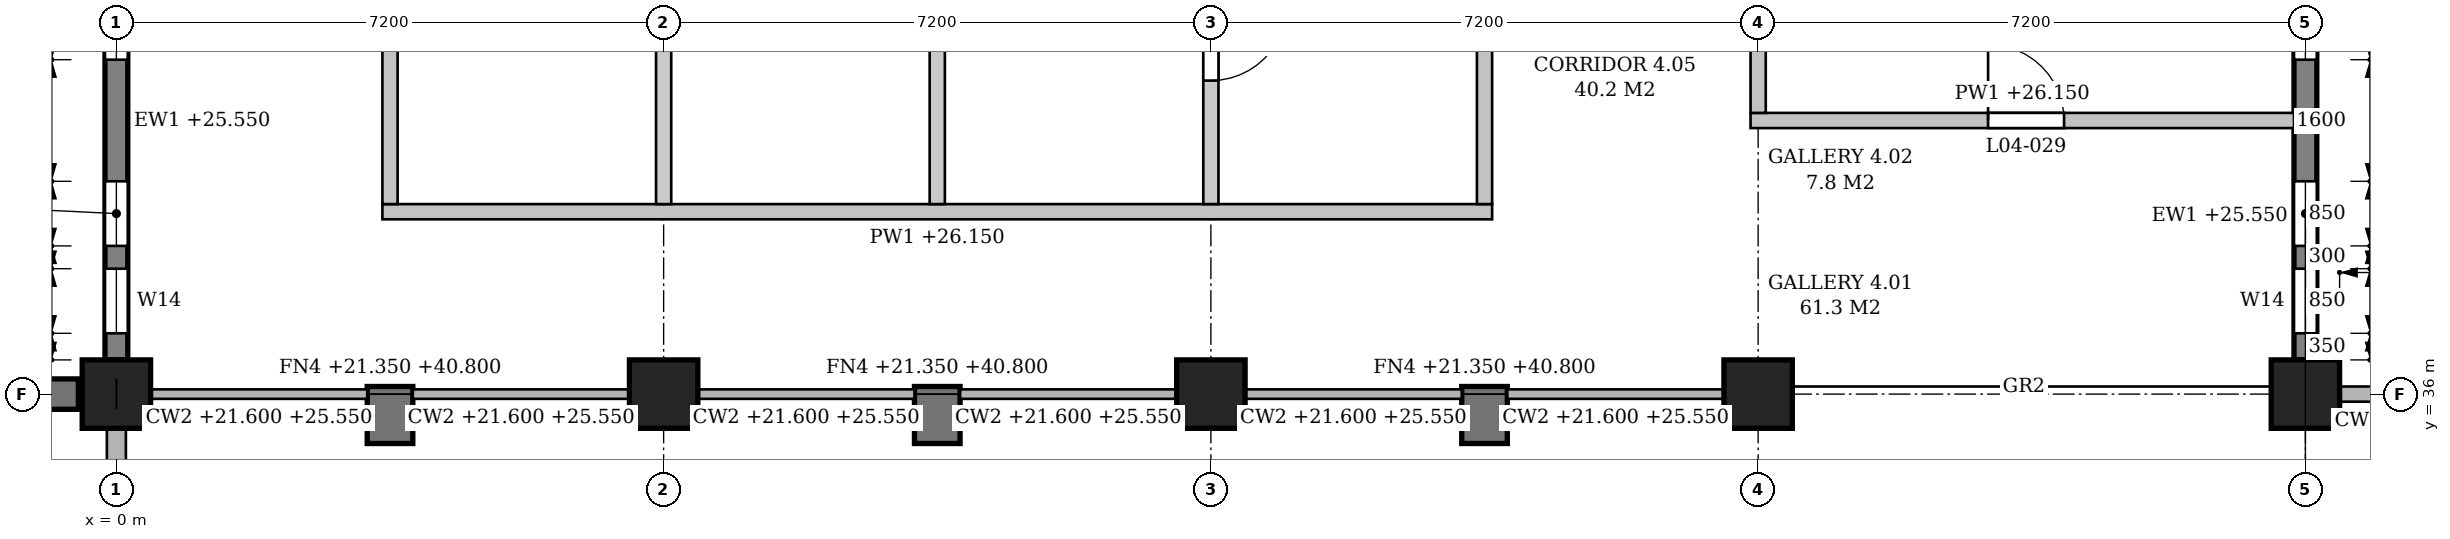
"""IFC4 building model, lengths in metres.
Left out: names, types, materials, properties, quantities, classifications, styles, units other than length and angle.
Written with IfcOpenShell. Run it as: python <this file> out.ifc"""

import sys

from ifc_helpers import new_model, si_unit, direction, frame, frame_2d, origin, origin_2d, place, context, subcontext, project, spatial, polyline, rectangle, outline, extrude, element, fill, save


model = new_model("IFC4")
c1 = context("Model", 3, precision=1e-05, world=origin(), true_north=direction((0.0, 1.0)))
c2 = subcontext(c1, "Body", "Model", "MODEL_VIEW")
j1 = project(units=[si_unit("LENGTHUNIT", "METRE"), si_unit("PLANEANGLEUNIT", "RADIAN")], contexts=[c1])
p1 = place(None, origin())
s1 = spatial("IfcSite", under=j1, at=p1, CompositionType="ELEMENT")
p2 = place(p1, origin())
s2 = spatial("IfcBuilding", under=s1, at=p2, CompositionType="ELEMENT")
p3 = place(p2, frame((0.0, 0.0, 21.6)))
s3 = spatial("IfcBuildingStorey", under=s2, at=p3, CompositionType="ELEMENT", Elevation=21.6)
for number, where, z_axis, x_axis in (
    (1, (0.0, 36.0, 0.0), (0.0, 0.0, 1.0), (1.0, 0.0, 0.0)),
    (2, (7.2, 36.0, 0.0), (0.0, 0.0, 1.0), (1.0, 0.0, 0.0)),
    (3, (14.4, 36.0, 0.0), (0.0, 0.0, 1.0), (1.0, 0.0, 0.0)),
    (4, (21.6, 36.0, 0.0), (0.0, 0.0, 1.0), (1.0, 0.0, 0.0)),
    (5, (28.8, 36.0, 0.0), (0.0, 0.0, 1.0), (1.0, 0.0, 0.0)),
):
    element("IfcColumn", number, at=place(p3, frame(where, z_axis=z_axis, x_axis=x_axis)), inside=s3, PredefinedType="COLUMN", context=c2, shape_type="SweptSolid", body=[
        extrude(rectangle(XDim=0.9, YDim=0.9, at=origin_2d()), origin(), (0.0, 0.0, 1.0), 4.8),
    ])
p4 = place(p3, frame((0.0, 36.45, 0.0), z_axis=(0.0, 0.0, 1.0), x_axis=(0.0, 1.0, 0.0)))
e6 = element("IfcWall", 6, at=p4, inside=s3, PredefinedType="STANDARD", context=c2, shape_type="SweptSolid", body=[
    extrude(rectangle(XDim=6.3, YDim=0.3, at=frame_2d((3.15, 0.0))), origin(), (0.0, 0.0, 1.0), 3.95),
])
p5 = place(p4, frame((0.35, 0.0, 0.9)))
e7 = element("IfcOpeningElement", 7, at=p5, cuts=e6, PredefinedType="OPENING", context=c2, shape_type="SweptSolid", body=[
    extrude(outline(polyline([(0.0, 0.0), (0.85, 0.0), (0.85, 2.05), (0.425, 2.5), (0.0, 2.05), (0.0, 0.0)])), frame((0.0, 0.16, 0.0), z_axis=(0.0, -1.0, 0.0), x_axis=(1.0, 0.0, 0.0)), (0.0, 0.0, 1.0), 0.32),
])
p6 = place(p4, frame((1.5, 0.0, 0.9)))
e8 = element("IfcOpeningElement", 8, at=p6, cuts=e6, PredefinedType="OPENING", context=c2, shape_type="SweptSolid", body=[
    extrude(outline(polyline([(0.0, 0.0), (0.85, 0.0), (0.85, 2.05), (0.425, 2.5), (0.0, 2.05), (0.0, 0.0)])), frame((0.0, 0.16, 0.0), z_axis=(0.0, -1.0, 0.0), x_axis=(1.0, 0.0, 0.0)), (0.0, 0.0, 1.0), 0.32),
])
p7 = place(p4, frame((3.95, 0.0, 0.9)))
e9 = element("IfcOpeningElement", 9, at=p7, cuts=e6, PredefinedType="OPENING", context=c2, shape_type="SweptSolid", body=[
    extrude(outline(polyline([(0.0, 0.0), (0.85, 0.0), (0.85, 2.05), (0.425, 2.5), (0.0, 2.05), (0.0, 0.0)])), frame((0.0, 0.16, 0.0), z_axis=(0.0, -1.0, 0.0), x_axis=(1.0, 0.0, 0.0)), (0.0, 0.0, 1.0), 0.32),
])
p8 = place(p4, frame((5.1, 0.0, 0.9)))
e10 = element("IfcOpeningElement", 10, at=p8, cuts=e6, PredefinedType="OPENING", context=c2, shape_type="SweptSolid", body=[
    extrude(outline(polyline([(0.0, 0.0), (0.85, 0.0), (0.85, 2.05), (0.425, 2.5), (0.0, 2.05), (0.0, 0.0)])), frame((0.0, 0.16, 0.0), z_axis=(0.0, -1.0, 0.0), x_axis=(1.0, 0.0, 0.0)), (0.0, 0.0, 1.0), 0.32),
])
p9 = place(p3, frame((28.8, 36.45, 0.0), z_axis=(0.0, 0.0, 1.0), x_axis=(0.0, 1.0, 0.0)))
e11 = element("IfcWall", 11, at=p9, inside=s3, PredefinedType="STANDARD", context=c2, shape_type="SweptSolid", body=[
    extrude(rectangle(XDim=6.3, YDim=0.3, at=frame_2d((3.15, 0.0))), origin(), (0.0, 0.0, 1.0), 3.95),
])
p10 = place(p9, frame((0.35, 0.0, 0.9)))
e12 = element("IfcOpeningElement", 12, at=p10, cuts=e11, PredefinedType="OPENING", context=c2, shape_type="SweptSolid", body=[
    extrude(outline(polyline([(0.0, 0.0), (0.85, 0.0), (0.85, 2.05), (0.425, 2.5), (0.0, 2.05), (0.0, 0.0)])), frame((0.0, 0.16, 0.0), z_axis=(0.0, -1.0, 0.0), x_axis=(1.0, 0.0, 0.0)), (0.0, 0.0, 1.0), 0.32),
])
p11 = place(p9, frame((1.5, 0.0, 0.9)))
e13 = element("IfcOpeningElement", 13, at=p11, cuts=e11, PredefinedType="OPENING", context=c2, shape_type="SweptSolid", body=[
    extrude(outline(polyline([(0.0, 0.0), (0.85, 0.0), (0.85, 2.05), (0.425, 2.5), (0.0, 2.05), (0.0, 0.0)])), frame((0.0, 0.16, 0.0), z_axis=(0.0, -1.0, 0.0), x_axis=(1.0, 0.0, 0.0)), (0.0, 0.0, 1.0), 0.32),
])
p12 = place(p9, frame((3.95, 0.0, 0.9)))
e14 = element("IfcOpeningElement", 14, at=p12, cuts=e11, PredefinedType="OPENING", context=c2, shape_type="SweptSolid", body=[
    extrude(outline(polyline([(0.0, 0.0), (0.85, 0.0), (0.85, 2.05), (0.425, 2.5), (0.0, 2.05), (0.0, 0.0)])), frame((0.0, 0.16, 0.0), z_axis=(0.0, -1.0, 0.0), x_axis=(1.0, 0.0, 0.0)), (0.0, 0.0, 1.0), 0.32),
])
p13 = place(p9, frame((5.1, 0.0, 0.9)))
e15 = element("IfcOpeningElement", 15, at=p13, cuts=e11, PredefinedType="OPENING", context=c2, shape_type="SweptSolid", body=[
    extrude(outline(polyline([(0.0, 0.0), (0.85, 0.0), (0.85, 2.05), (0.425, 2.5), (0.0, 2.05), (0.0, 0.0)])), frame((0.0, 0.16, 0.0), z_axis=(0.0, -1.0, 0.0), x_axis=(1.0, 0.0, 0.0)), (0.0, 0.0, 1.0), 0.32),
])
for number, where, z_axis, x_axis in (
    (16, (3.6, 36.1, -0.25), (0.0, 0.0, 1.0), (0.0, -1.0, 0.0)),
    (17, (10.8, 36.1, -0.25), (0.0, 0.0, 1.0), (0.0, -1.0, 0.0)),
    (18, (18.0, 36.1, -0.25), (0.0, 0.0, 1.0), (0.0, -1.0, 0.0)),
):
    element("IfcWall", number, at=place(p3, frame(where, z_axis=z_axis, x_axis=x_axis)), inside=s3, PredefinedType="POLYGONAL", context=c2, shape_type="SweptSolid", body=[
        extrude(outline(polyline([(0.75, 0.0), (0.75, 19.0), (0.45, 19.45), (0.3, 19.45), (0.3, 18.6), (0.0, 18.6), (0.0, 14.65), (0.35, 14.65), (0.35, 13.8), (0.0, 13.8), (0.0, 9.85), (0.35, 9.85), (0.35, 9.0), (0.0, 9.0), (0.0, 5.05), (0.35, 5.05), (0.35, 4.2), (0.0, 4.2), (0.0, 0.25), (0.35, 0.25), (0.35, 0.0), (0.75, 0.0)])), frame((0.0, 0.3, 0.0), z_axis=(0.0, -1.0, 0.0), x_axis=(1.0, 0.0, 0.0)), (0.0, 0.0, 1.0), 0.6),
    ])
p14 = place(p3, frame((-0.5, 36.0, -0.25), z_axis=(0.0, 0.0, 1.0), x_axis=(-1.0, 0.0, 0.0)))
e19 = element("IfcWall", 19, at=p14, inside=s3, PredefinedType="POLYGONAL", context=c2, shape_type="SweptSolid", body=[
    extrude(outline(polyline([(0.6, 0.0), (0.6, 19.125), (0.55, 19.2), (0.0, 19.2), (0.0, 0.0), (0.6, 0.0)])), frame((0.0, 0.2, 0.0), z_axis=(0.0, -1.0, 0.0), x_axis=(1.0, 0.0, 0.0)), (0.0, 0.0, 1.0), 0.4),
])
p15 = place(p3, frame((3.5, 38.4, 0.0), z_axis=(0.0, 0.0, 1.0), x_axis=(1.0, 0.0, 0.0)))
e20 = element("IfcWall", 20, at=p15, inside=s3, PredefinedType="PARTITIONING", context=c2, shape_type="SweptSolid", body=[
    extrude(outline(polyline([(0.0, 0.0), (14.6, 0.0), (14.6, 4.55), (11.15, 4.55), (11.15, 3.8), (10.65, 3.8), (10.65, 4.55), (3.95, 4.55), (3.95, 3.8), (3.45, 3.8), (3.45, 4.55), (0.0, 4.55), (0.0, 0.0)])), frame((0.0, 0.1, 0.0), z_axis=(0.0, -1.0, 0.0), x_axis=(1.0, 0.0, 0.0)), (0.0, 0.0, 1.0), 0.2),
])
p16 = place(p3, frame((21.5, 39.6, 0.0), z_axis=(0.0, 0.0, 1.0), x_axis=(1.0, 0.0, 0.0)))
e21 = element("IfcWall", 21, at=p16, inside=s3, PredefinedType="PARTITIONING", context=c2, shape_type="SweptSolid", body=[
    extrude(outline(polyline([(0.0, 0.0), (7.15, 0.0), (7.15, 3.95), (7.05, 3.95), (7.05, 4.55), (0.35, 4.55), (0.35, 3.8), (0.0, 3.8), (0.0, 0.0)])), frame((0.0, 0.1, 0.0), z_axis=(0.0, -1.0, 0.0), x_axis=(1.0, 0.0, 0.0)), (0.0, 0.0, 1.0), 0.2),
])
p17 = place(p16, frame((3.125, 0.0, 0.0)))
e22 = element("IfcOpeningElement", 22, at=p17, cuts=e21, PredefinedType="OPENING", context=c2, shape_type="SweptSolid", body=[
    extrude(rectangle(XDim=1.0, YDim=2.1, at=frame_2d((0.5, 1.05))), frame((0.0, 0.11, 0.0), z_axis=(0.0, -1.0, 0.0), x_axis=(1.0, 0.0, 0.0)), (0.0, 0.0, 1.0), 0.22),
])
p18 = place(p3, frame((3.6, 38.5, 0.0), z_axis=(0.0, 0.0, 1.0), x_axis=(0.0, 1.0, 0.0)))
e23 = element("IfcWall", 23, at=p18, inside=s3, PredefinedType="PARTITIONING", context=c2, shape_type="SweptSolid", body=[
    extrude(outline(polyline([(0.0, 0.0), (9.4, 0.0), (9.4, 4.55), (4.95, 4.55), (4.95, 3.8), (4.45, 3.8), (4.45, 4.55), (0.0, 4.55), (0.0, 0.0)])), frame((0.0, 0.1, 0.0), z_axis=(0.0, -1.0, 0.0), x_axis=(1.0, 0.0, 0.0)), (0.0, 0.0, 1.0), 0.2),
])
p19 = place(p18, frame((4.2, 0.0, 0.0)))
e24 = element("IfcOpeningElement", 24, at=p19, cuts=e23, PredefinedType="OPENING", context=c2, shape_type="SweptSolid", body=[
    extrude(rectangle(XDim=1.0, YDim=2.1, at=frame_2d((0.5, 1.05))), frame((0.0, 0.11, 0.0), z_axis=(0.0, -1.0, 0.0), x_axis=(1.0, 0.0, 0.0)), (0.0, 0.0, 1.0), 0.22),
])
p20 = place(p3, frame((7.2, 38.5, 0.0), z_axis=(0.0, 0.0, 1.0), x_axis=(0.0, 1.0, 0.0)))
e25 = element("IfcWall", 25, at=p20, inside=s3, PredefinedType="PARTITIONING", context=c2, shape_type="SweptSolid", body=[
    extrude(rectangle(XDim=4.25, YDim=0.2, at=frame_2d((2.125, 0.0))), origin(), (0.0, 0.0, 1.0), 3.8),
])
p21 = place(p3, frame((10.8, 38.5, 0.0), z_axis=(0.0, 0.0, 1.0), x_axis=(0.0, 1.0, 0.0)))
e26 = element("IfcWall", 26, at=p21, inside=s3, PredefinedType="PARTITIONING", context=c2, shape_type="SweptSolid", body=[
    extrude(outline(polyline([(0.0, 0.0), (9.4, 0.0), (9.4, 4.55), (4.95, 4.55), (4.95, 3.8), (4.45, 3.8), (4.45, 4.55), (0.0, 4.55), (0.0, 0.0)])), frame((0.0, 0.1, 0.0), z_axis=(0.0, -1.0, 0.0), x_axis=(1.0, 0.0, 0.0)), (0.0, 0.0, 1.0), 0.2),
])
p22 = place(p3, frame((14.4, 38.5, 0.0), z_axis=(0.0, 0.0, 1.0), x_axis=(0.0, 1.0, 0.0)))
e27 = element("IfcWall", 27, at=p22, inside=s3, PredefinedType="PARTITIONING", context=c2, shape_type="SweptSolid", body=[
    extrude(rectangle(XDim=4.25, YDim=0.2, at=frame_2d((2.125, 0.0))), origin(), (0.0, 0.0, 1.0), 3.8),
])
p23 = place(p22, frame((1.625, 0.0, 0.0)))
e28 = element("IfcOpeningElement", 28, at=p23, cuts=e27, PredefinedType="OPENING", context=c2, shape_type="SweptSolid", body=[
    extrude(rectangle(XDim=1.0, YDim=2.1, at=frame_2d((0.5, 1.05))), frame((0.0, 0.11, 0.0), z_axis=(0.0, -1.0, 0.0), x_axis=(1.0, 0.0, 0.0)), (0.0, 0.0, 1.0), 0.22),
])
p24 = place(p3, frame((18.0, 38.5, 0.0), z_axis=(0.0, 0.0, 1.0), x_axis=(0.0, 1.0, 0.0)))
e29 = element("IfcWall", 29, at=p24, inside=s3, PredefinedType="PARTITIONING", context=c2, shape_type="SweptSolid", body=[
    extrude(outline(polyline([(0.0, 0.0), (9.4, 0.0), (9.4, 4.55), (4.95, 4.55), (4.95, 3.8), (4.45, 3.8), (4.45, 4.55), (0.0, 4.55), (0.0, 0.0)])), frame((0.0, 0.1, 0.0), z_axis=(0.0, -1.0, 0.0), x_axis=(1.0, 0.0, 0.0)), (0.0, 0.0, 1.0), 0.2),
])
p25 = place(p3, frame((21.6, 39.7, 0.0), z_axis=(0.0, 0.0, 1.0), x_axis=(0.0, 1.0, 0.0)))
e30 = element("IfcWall", 30, at=p25, inside=s3, PredefinedType="PARTITIONING", context=c2, shape_type="SweptSolid", body=[
    extrude(rectangle(XDim=3.05, YDim=0.2, at=frame_2d((1.525, 0.0))), origin(), (0.0, 0.0, 1.0), 3.8),
])
p26 = place(p10, origin())
e31 = element("IfcWindow", 31, at=p26, inside=s3, PartitioningType="SINGLE_PANEL", PredefinedType="WINDOW", context=c2, shape_type="SweptSolid", body=[
    extrude(outline(polyline([(0.0, 0.0), (0.85, 0.0), (0.85, 2.05), (0.425, 2.5), (0.0, 2.05), (0.0, 0.0)])), frame((0.0, 0.03, 0.0), z_axis=(0.0, -1.0, 0.0), x_axis=(1.0, 0.0, 0.0)), (0.0, 0.0, 1.0), 0.06),
])
fill(e12, e31)
p27 = place(p11, origin())
e32 = element("IfcWindow", 32, at=p27, inside=s3, PartitioningType="SINGLE_PANEL", PredefinedType="WINDOW", context=c2, shape_type="SweptSolid", body=[
    extrude(outline(polyline([(0.0, 0.0), (0.85, 0.0), (0.85, 2.05), (0.425, 2.5), (0.0, 2.05), (0.0, 0.0)])), frame((0.0, 0.03, 0.0), z_axis=(0.0, -1.0, 0.0), x_axis=(1.0, 0.0, 0.0)), (0.0, 0.0, 1.0), 0.06),
])
fill(e13, e32)
p28 = place(p12, origin())
e33 = element("IfcWindow", 33, at=p28, inside=s3, PartitioningType="SINGLE_PANEL", PredefinedType="WINDOW", context=c2, shape_type="SweptSolid", body=[
    extrude(outline(polyline([(0.0, 0.0), (0.85, 0.0), (0.85, 2.05), (0.425, 2.5), (0.0, 2.05), (0.0, 0.0)])), frame((0.0, 0.03, 0.0), z_axis=(0.0, -1.0, 0.0), x_axis=(1.0, 0.0, 0.0)), (0.0, 0.0, 1.0), 0.06),
])
fill(e14, e33)
p29 = place(p5, origin())
e34 = element("IfcWindow", 34, at=p29, inside=s3, PartitioningType="SINGLE_PANEL", PredefinedType="WINDOW", context=c2, shape_type="SweptSolid", body=[
    extrude(outline(polyline([(0.0, 0.0), (0.85, 0.0), (0.85, 2.05), (0.425, 2.5), (0.0, 2.05), (0.0, 0.0)])), frame((0.0, 0.03, 0.0), z_axis=(0.0, -1.0, 0.0), x_axis=(1.0, 0.0, 0.0)), (0.0, 0.0, 1.0), 0.06),
])
fill(e7, e34)
p30 = place(p6, origin())
e35 = element("IfcWindow", 35, at=p30, inside=s3, PartitioningType="SINGLE_PANEL", PredefinedType="WINDOW", context=c2, shape_type="SweptSolid", body=[
    extrude(outline(polyline([(0.0, 0.0), (0.85, 0.0), (0.85, 2.05), (0.425, 2.5), (0.0, 2.05), (0.0, 0.0)])), frame((0.0, 0.03, 0.0), z_axis=(0.0, -1.0, 0.0), x_axis=(1.0, 0.0, 0.0)), (0.0, 0.0, 1.0), 0.06),
])
fill(e8, e35)
p31 = place(p7, origin())
e36 = element("IfcWindow", 36, at=p31, inside=s3, PartitioningType="SINGLE_PANEL", PredefinedType="WINDOW", context=c2, shape_type="SweptSolid", body=[
    extrude(outline(polyline([(0.0, 0.0), (0.85, 0.0), (0.85, 2.05), (0.425, 2.5), (0.0, 2.05), (0.0, 0.0)])), frame((0.0, 0.03, 0.0), z_axis=(0.0, -1.0, 0.0), x_axis=(1.0, 0.0, 0.0)), (0.0, 0.0, 1.0), 0.06),
])
fill(e9, e36)
p32 = place(p23, frame((1.0, 0.0, 0.0), z_axis=(0.0, 0.0, 1.0), x_axis=(-1.0, 0.0, 0.0)))
e37 = element("IfcDoor", 37, at=p32, inside=s3, OperationType="SINGLE_SWING_LEFT", PredefinedType="DOOR", context=c2, shape_type="SweptSolid", body=[
    extrude(rectangle(XDim=1.0, YDim=2.1, at=frame_2d((0.5, 1.05))), frame((0.0, 0.025, 0.0), z_axis=(0.0, -1.0, 0.0), x_axis=(1.0, 0.0, 0.0)), (0.0, 0.0, 1.0), 0.05),
])
fill(e28, e37)
p33 = place(p17, origin())
e38 = element("IfcDoor", 38, at=p33, inside=s3, OperationType="SINGLE_SWING_LEFT", PredefinedType="DOOR", context=c2, shape_type="SweptSolid", body=[
    extrude(rectangle(XDim=1.0, YDim=2.1, at=frame_2d((0.5, 1.05))), frame((0.0, 0.025, 0.0), z_axis=(0.0, -1.0, 0.0), x_axis=(1.0, 0.0, 0.0)), (0.0, 0.0, 1.0), 0.05),
])
fill(e22, e38)
save(model, sys.argv[1])
